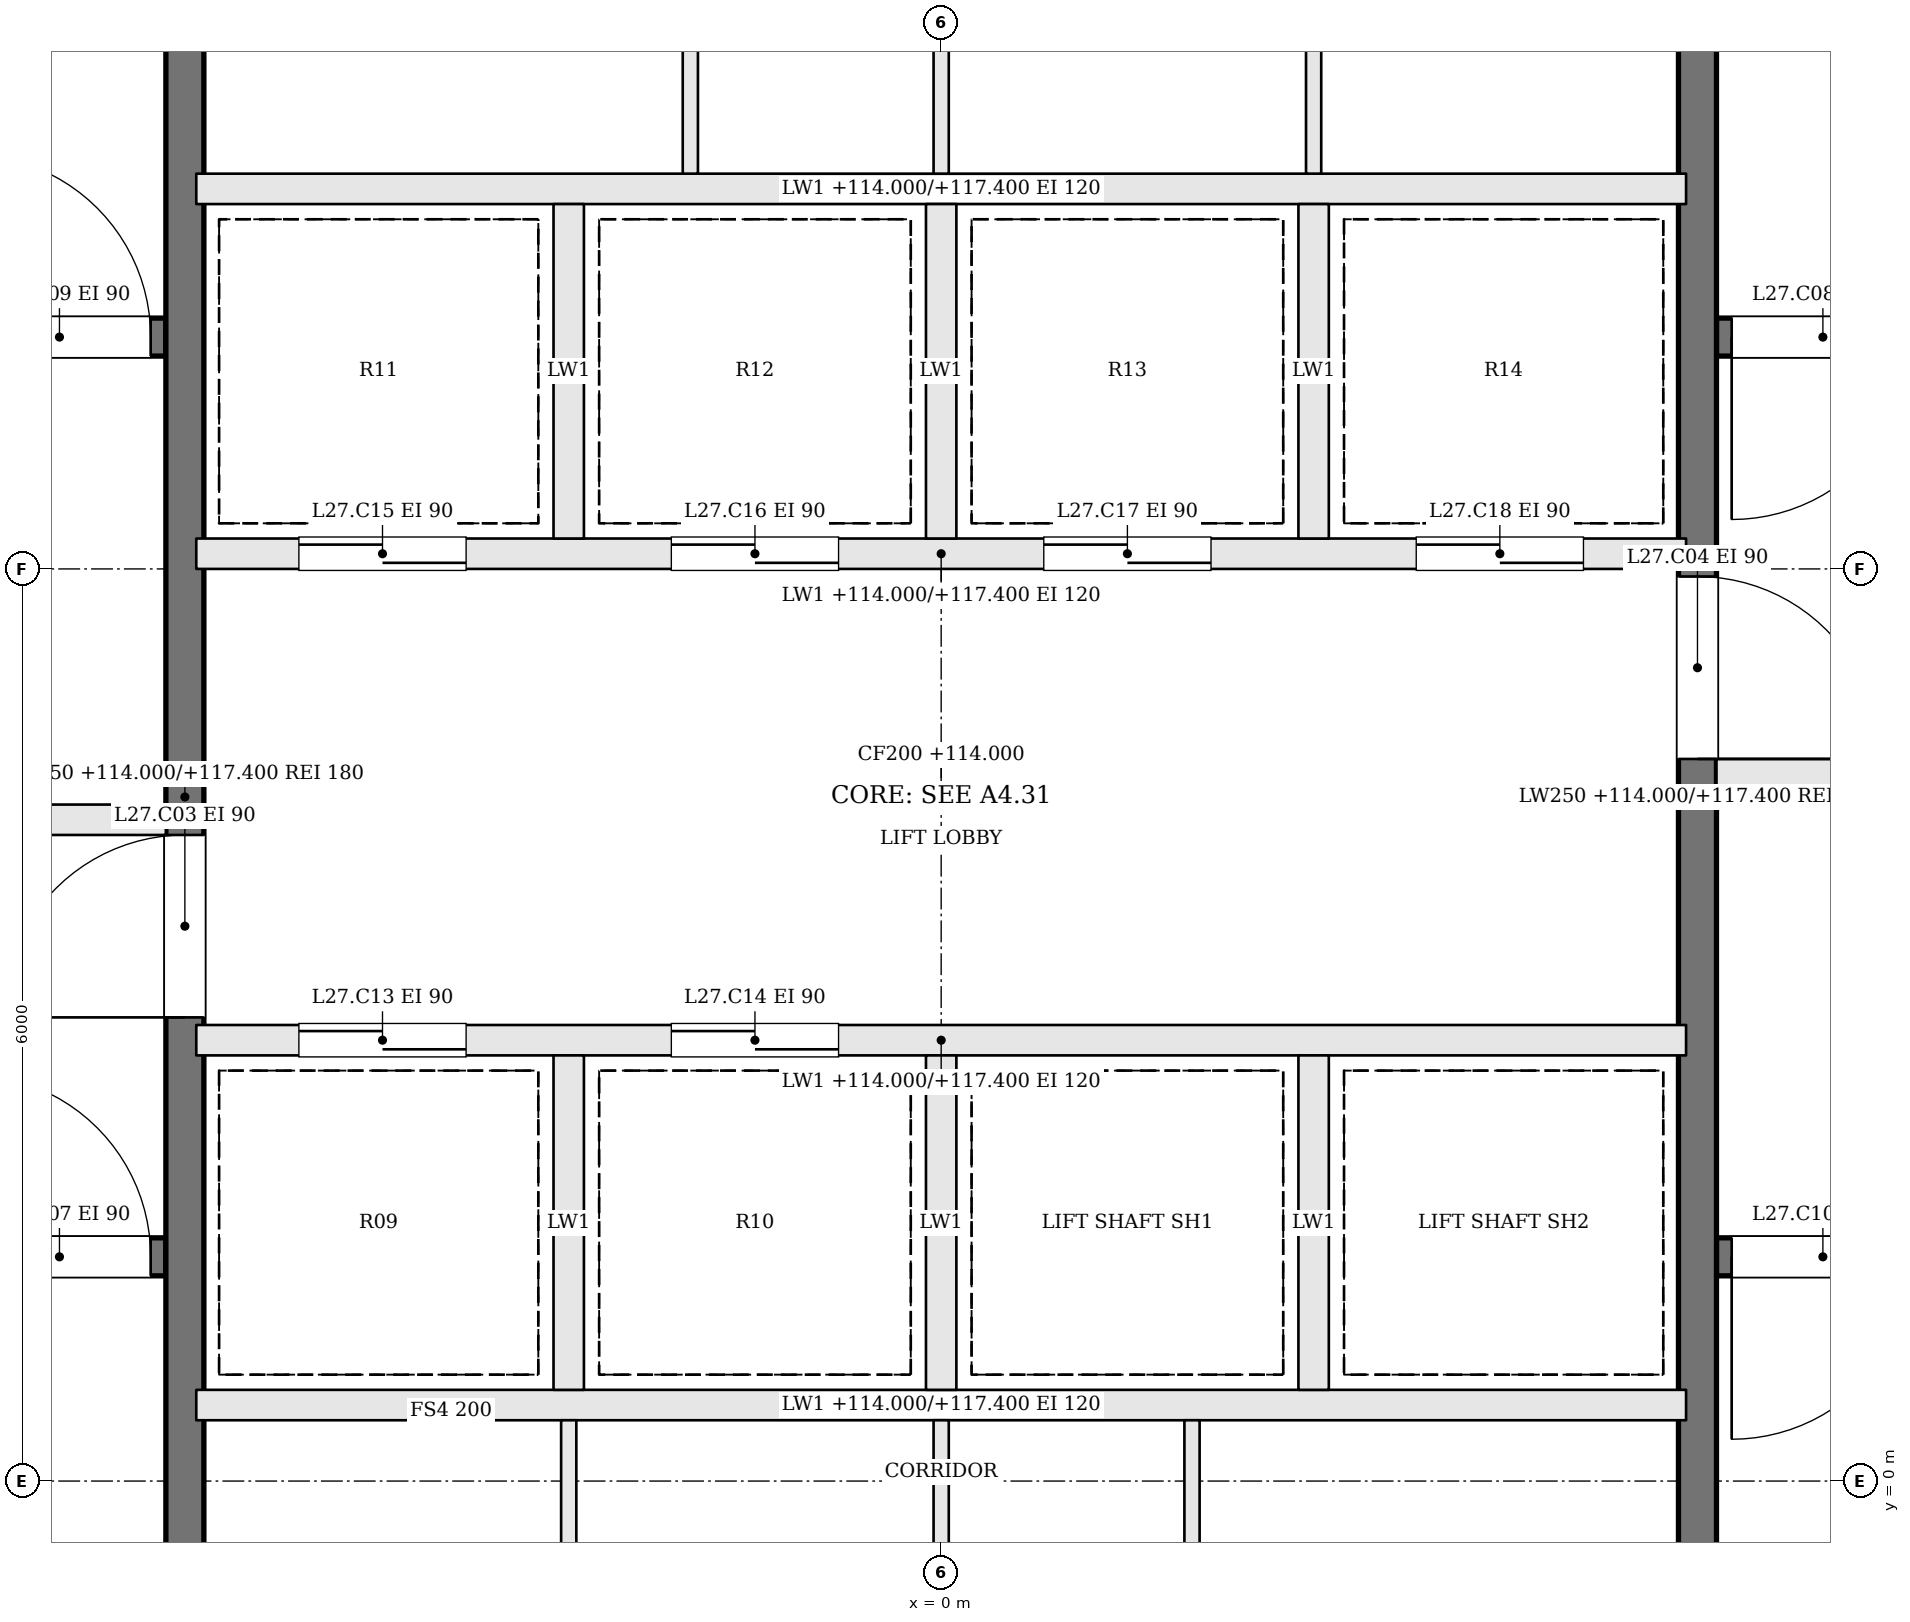
"""IFC4 building model, lengths in metres.
Left out: names, types, materials, properties, quantities, classifications, styles, units other than length and angle.
Written with IfcOpenShell. Run it as: python <this file> out.ifc"""

import sys

from ifc_helpers import new_model, si_unit, direction, frame, frame_2d, origin, place, context, subcontext, project, spatial, rectangle, extrude, element, fill, save


model = new_model("IFC4")
c1 = context("Model", 3, precision=1e-05, world=origin(), true_north=direction((0.0, 1.0)))
c2 = subcontext(c1, "Body", "Model", "MODEL_VIEW")
j1 = project(units=[si_unit("LENGTHUNIT", "METRE"), si_unit("PLANEANGLEUNIT", "RADIAN")], contexts=[c1])
p1 = place(None, origin())
s1 = spatial("IfcSite", under=j1, at=p1, CompositionType="ELEMENT")
p2 = place(p1, origin())
s2 = spatial("IfcBuilding", under=s1, at=p2, CompositionType="ELEMENT")
p3 = place(p2, frame((0.0, 0.0, 114.0)))
s3 = spatial("IfcBuildingStorey", under=s2, at=p3, CompositionType="ELEMENT", Elevation=114.0)
p4 = place(p3, frame((-11.9, 1.475, 0.0), z_axis=(0.0, 0.0, 1.0), x_axis=(1.0, 0.0, 0.0)))
e1 = element("IfcWall", 1, at=p4, inside=s3, PredefinedType="SOLIDWALL", context=c2, shape_type="SweptSolid", body=[
    extrude(rectangle(XDim=6.8, YDim=0.25, at=frame_2d((3.4, 0.0))), origin(), (0.0, 0.0, 1.0), 3.4),
])
p5 = place(p4, frame((5.5, 0.0, 0.0)))
e2 = element("IfcOpeningElement", 2, at=p5, cuts=e1, PredefinedType="OPENING", context=c2, shape_type="SweptSolid", body=[
    extrude(rectangle(XDim=1.2, YDim=2.1, at=frame_2d((0.6, 1.05))), frame((0.0, 0.135, 0.0), z_axis=(0.0, -1.0, 0.0), x_axis=(1.0, 0.0, 0.0)), (0.0, 0.0, 1.0), 0.27),
])
p6 = place(p3, frame((11.9, 7.525, 0.0), z_axis=(0.0, 0.0, 1.0), x_axis=(-1.0, 0.0, 0.0)))
e3 = element("IfcWall", 3, at=p6, inside=s3, PredefinedType="SOLIDWALL", context=c2, shape_type="SweptSolid", body=[
    extrude(rectangle(XDim=6.8, YDim=0.25, at=frame_2d((3.4, 0.0))), origin(), (0.0, 0.0, 1.0), 3.4),
])
p7 = place(p6, frame((5.5, 0.0, 0.0)))
e4 = element("IfcOpeningElement", 4, at=p7, cuts=e3, PredefinedType="OPENING", context=c2, shape_type="SweptSolid", body=[
    extrude(rectangle(XDim=1.2, YDim=2.1, at=frame_2d((0.6, 1.05))), frame((0.0, 0.135, 0.0), z_axis=(0.0, -1.0, 0.0), x_axis=(1.0, 0.0, 0.0)), (0.0, 0.0, 1.0), 0.27),
])
p8 = place(p3, frame((-11.9, 4.35, 0.0), z_axis=(0.0, 0.0, 1.0), x_axis=(1.0, 0.0, 0.0)))
e5 = element("IfcWall", 5, at=p8, inside=s3, PredefinedType="SOLIDWALL", context=c2, shape_type="SweptSolid", body=[
    extrude(rectangle(XDim=6.8, YDim=0.2, at=frame_2d((3.4, 0.0))), origin(), (0.0, 0.0, 1.0), 3.4),
])
p9 = place(p8, frame((4.1, 0.0, 0.0)))
e6 = element("IfcOpeningElement", 6, at=p9, cuts=e5, PredefinedType="OPENING", context=c2, shape_type="SweptSolid", body=[
    extrude(rectangle(XDim=1.2, YDim=2.1, at=frame_2d((0.6, 1.05))), frame((0.0, 0.11, 0.0), z_axis=(0.0, -1.0, 0.0), x_axis=(1.0, 0.0, 0.0)), (0.0, 0.0, 1.0), 0.22),
])
p10 = place(p8, frame((0.8, 0.0, 0.0)))
e7 = element("IfcOpeningElement", 7, at=p10, cuts=e5, PredefinedType="OPENING", context=c2, shape_type="SweptSolid", body=[
    extrude(rectangle(XDim=1.2, YDim=2.1, at=frame_2d((0.6, 1.05))), frame((0.0, 0.11, 0.0), z_axis=(0.0, -1.0, 0.0), x_axis=(1.0, 0.0, 0.0)), (0.0, 0.0, 1.0), 0.22),
])
p11 = place(p3, frame((11.9, 4.65, 0.0), z_axis=(0.0, 0.0, 1.0), x_axis=(-1.0, 0.0, 0.0)))
e8 = element("IfcWall", 8, at=p11, inside=s3, PredefinedType="SOLIDWALL", context=c2, shape_type="SweptSolid", body=[
    extrude(rectangle(XDim=6.8, YDim=0.2, at=frame_2d((3.4, 0.0))), origin(), (0.0, 0.0, 1.0), 3.4),
])
p12 = place(p11, frame((4.1, 0.0, 0.0)))
e9 = element("IfcOpeningElement", 9, at=p12, cuts=e8, PredefinedType="OPENING", context=c2, shape_type="SweptSolid", body=[
    extrude(rectangle(XDim=1.2, YDim=2.1, at=frame_2d((0.6, 1.05))), frame((0.0, 0.11, 0.0), z_axis=(0.0, -1.0, 0.0), x_axis=(1.0, 0.0, 0.0)), (0.0, 0.0, 1.0), 0.22),
])
p13 = place(p11, frame((0.8, 0.0, 0.0)))
e10 = element("IfcOpeningElement", 10, at=p13, cuts=e8, PredefinedType="OPENING", context=c2, shape_type="SweptSolid", body=[
    extrude(rectangle(XDim=1.2, YDim=2.1, at=frame_2d((0.6, 1.05))), frame((0.0, 0.11, 0.0), z_axis=(0.0, -1.0, 0.0), x_axis=(1.0, 0.0, 0.0)), (0.0, 0.0, 1.0), 0.22),
])
p14 = place(p3, frame((-11.9, 7.525, 0.0), z_axis=(0.0, 0.0, 1.0), x_axis=(1.0, 0.0, 0.0)))
e11 = element("IfcWall", 11, at=p14, inside=s3, PredefinedType="SOLIDWALL", context=c2, shape_type="SweptSolid", body=[
    extrude(rectangle(XDim=6.8, YDim=0.25, at=frame_2d((3.4, 0.0))), origin(), (0.0, 0.0, 1.0), 3.4),
])
p15 = place(p14, frame((5.5, 0.0, 0.0)))
e12 = element("IfcOpeningElement", 12, at=p15, cuts=e11, PredefinedType="OPENING", context=c2, shape_type="SweptSolid", body=[
    extrude(rectangle(XDim=1.2, YDim=2.1, at=frame_2d((0.6, 1.05))), frame((0.0, 0.135, 0.0), z_axis=(0.0, -1.0, 0.0), x_axis=(1.0, 0.0, 0.0)), (0.0, 0.0, 1.0), 0.27),
])
p16 = place(p3, frame((11.9, 1.475, 0.0), z_axis=(0.0, 0.0, 1.0), x_axis=(-1.0, 0.0, 0.0)))
e13 = element("IfcWall", 13, at=p16, inside=s3, PredefinedType="SOLIDWALL", context=c2, shape_type="SweptSolid", body=[
    extrude(rectangle(XDim=6.8, YDim=0.25, at=frame_2d((3.4, 0.0))), origin(), (0.0, 0.0, 1.0), 3.4),
])
p17 = place(p16, frame((5.5, 0.0, 0.0)))
e14 = element("IfcOpeningElement", 14, at=p17, cuts=e13, PredefinedType="OPENING", context=c2, shape_type="SweptSolid", body=[
    extrude(rectangle(XDim=1.2, YDim=2.1, at=frame_2d((0.6, 1.05))), frame((0.0, 0.135, 0.0), z_axis=(0.0, -1.0, 0.0), x_axis=(1.0, 0.0, 0.0)), (0.0, 0.0, 1.0), 0.27),
])
p18 = place(p3, frame((-4.975, -1.9, 0.0), z_axis=(0.0, 0.0, 1.0), x_axis=(0.0, 1.0, 0.0)))
e15 = element("IfcWall", 15, at=p18, inside=s3, PredefinedType="SOLIDWALL", context=c2, shape_type="SweptSolid", body=[
    extrude(rectangle(XDim=12.8, YDim=0.25, at=frame_2d((6.4, 0.0))), origin(), (0.0, 0.0, 1.0), 3.4),
])
p19 = place(p18, frame((4.95, 0.0, 0.0)))
e16 = element("IfcOpeningElement", 16, at=p19, cuts=e15, PredefinedType="OPENING", context=c2, shape_type="SweptSolid", body=[
    extrude(rectangle(XDim=1.2, YDim=2.1, at=frame_2d((0.6, 1.05))), frame((0.0, 0.135, 0.0), z_axis=(0.0, -1.0, 0.0), x_axis=(1.0, 0.0, 0.0)), (0.0, 0.0, 1.0), 0.27),
])
p20 = place(p3, frame((4.975, 10.9, 0.0), z_axis=(0.0, 0.0, 1.0), x_axis=(0.0, -1.0, 0.0)))
e17 = element("IfcWall", 17, at=p20, inside=s3, PredefinedType="SOLIDWALL", context=c2, shape_type="SweptSolid", body=[
    extrude(rectangle(XDim=12.8, YDim=0.25, at=frame_2d((6.4, 0.0))), origin(), (0.0, 0.0, 1.0), 3.4),
])
p21 = place(p20, frame((4.95, 0.0, 0.0)))
e18 = element("IfcOpeningElement", 18, at=p21, cuts=e17, PredefinedType="OPENING", context=c2, shape_type="SweptSolid", body=[
    extrude(rectangle(XDim=1.2, YDim=2.1, at=frame_2d((0.6, 1.05))), frame((0.0, 0.135, 0.0), z_axis=(0.0, -1.0, 0.0), x_axis=(1.0, 0.0, 0.0)), (0.0, 0.0, 1.0), 0.27),
])
p22 = place(p3, frame((-4.9, 0.5, 0.0), z_axis=(0.0, 0.0, 1.0), x_axis=(1.0, 0.0, 0.0)))
e19 = element("IfcWall", 19, at=p22, inside=s3, PredefinedType="SOLIDWALL", context=c2, shape_type="SweptSolid", body=[
    extrude(rectangle(XDim=9.8, YDim=0.2, at=frame_2d((4.9, 0.0))), origin(), (0.0, 0.0, 1.0), 3.4),
])
p23 = place(p3, frame((-4.9, 2.9, 0.0), z_axis=(0.0, 0.0, 1.0), x_axis=(1.0, 0.0, 0.0)))
e20 = element("IfcWall", 20, at=p23, inside=s3, PredefinedType="SOLIDWALL", context=c2, shape_type="SweptSolid", body=[
    extrude(rectangle(XDim=9.8, YDim=0.2, at=frame_2d((4.9, 0.0))), origin(), (0.0, 0.0, 1.0), 3.4),
])
p24 = place(p23, frame((0.675, 0.0, 0.0)))
e21 = element("IfcOpeningElement", 21, at=p24, cuts=e20, PredefinedType="OPENING", context=c2, shape_type="SweptSolid", body=[
    extrude(rectangle(XDim=1.1, YDim=2.1, at=frame_2d((0.55, 1.05))), frame((0.0, 0.11, 0.0), z_axis=(0.0, -1.0, 0.0), x_axis=(1.0, 0.0, 0.0)), (0.0, 0.0, 1.0), 0.22),
])
p25 = place(p23, frame((3.125, 0.0, 0.0)))
e22 = element("IfcOpeningElement", 22, at=p25, cuts=e20, PredefinedType="OPENING", context=c2, shape_type="SweptSolid", body=[
    extrude(rectangle(XDim=1.1, YDim=2.1, at=frame_2d((0.55, 1.05))), frame((0.0, 0.11, 0.0), z_axis=(0.0, -1.0, 0.0), x_axis=(1.0, 0.0, 0.0)), (0.0, 0.0, 1.0), 0.22),
])
p26 = place(p3, frame((-4.9, 6.1, 0.0), z_axis=(0.0, 0.0, 1.0), x_axis=(1.0, 0.0, 0.0)))
e23 = element("IfcWall", 23, at=p26, inside=s3, PredefinedType="SOLIDWALL", context=c2, shape_type="SweptSolid", body=[
    extrude(rectangle(XDim=9.8, YDim=0.2, at=frame_2d((4.9, 0.0))), origin(), (0.0, 0.0, 1.0), 3.4),
])
p27 = place(p26, frame((0.675, 0.0, 0.0)))
e24 = element("IfcOpeningElement", 24, at=p27, cuts=e23, PredefinedType="OPENING", context=c2, shape_type="SweptSolid", body=[
    extrude(rectangle(XDim=1.1, YDim=2.1, at=frame_2d((0.55, 1.05))), frame((0.0, 0.11, 0.0), z_axis=(0.0, -1.0, 0.0), x_axis=(1.0, 0.0, 0.0)), (0.0, 0.0, 1.0), 0.22),
])
p28 = place(p26, frame((3.125, 0.0, 0.0)))
e25 = element("IfcOpeningElement", 25, at=p28, cuts=e23, PredefinedType="OPENING", context=c2, shape_type="SweptSolid", body=[
    extrude(rectangle(XDim=1.1, YDim=2.1, at=frame_2d((0.55, 1.05))), frame((0.0, 0.11, 0.0), z_axis=(0.0, -1.0, 0.0), x_axis=(1.0, 0.0, 0.0)), (0.0, 0.0, 1.0), 0.22),
])
p29 = place(p26, frame((5.575, 0.0, 0.0)))
e26 = element("IfcOpeningElement", 26, at=p29, cuts=e23, PredefinedType="OPENING", context=c2, shape_type="SweptSolid", body=[
    extrude(rectangle(XDim=1.1, YDim=2.1, at=frame_2d((0.55, 1.05))), frame((0.0, 0.11, 0.0), z_axis=(0.0, -1.0, 0.0), x_axis=(1.0, 0.0, 0.0)), (0.0, 0.0, 1.0), 0.22),
])
p30 = place(p26, frame((8.025, 0.0, 0.0)))
e27 = element("IfcOpeningElement", 27, at=p30, cuts=e23, PredefinedType="OPENING", context=c2, shape_type="SweptSolid", body=[
    extrude(rectangle(XDim=1.1, YDim=2.1, at=frame_2d((0.55, 1.05))), frame((0.0, 0.11, 0.0), z_axis=(0.0, -1.0, 0.0), x_axis=(1.0, 0.0, 0.0)), (0.0, 0.0, 1.0), 0.22),
])
p31 = place(p3, frame((-4.9, 8.5, 0.0), z_axis=(0.0, 0.0, 1.0), x_axis=(1.0, 0.0, 0.0)))
e28 = element("IfcWall", 28, at=p31, inside=s3, PredefinedType="SOLIDWALL", context=c2, shape_type="SweptSolid", body=[
    extrude(rectangle(XDim=9.8, YDim=0.2, at=frame_2d((4.9, 0.0))), origin(), (0.0, 0.0, 1.0), 3.4),
])
for number, where, z_axis, x_axis in (
    (29, (-2.45, 0.6, 0.0), (0.0, 0.0, 1.0), (0.0, 1.0, 0.0)),
    (30, (0.0, 0.6, 0.0), (0.0, 0.0, 1.0), (0.0, 1.0, 0.0)),
    (31, (2.45, 0.6, 0.0), (0.0, 0.0, 1.0), (0.0, 1.0, 0.0)),
    (32, (-2.45, 6.2, 0.0), (0.0, 0.0, 1.0), (0.0, 1.0, 0.0)),
    (33, (0.0, 6.2, 0.0), (0.0, 0.0, 1.0), (0.0, 1.0, 0.0)),
    (34, (2.45, 6.2, 0.0), (0.0, 0.0, 1.0), (0.0, 1.0, 0.0)),
):
    element("IfcWall", number, at=place(p3, frame(where, z_axis=z_axis, x_axis=x_axis)), inside=s3, PredefinedType="SOLIDWALL", context=c2, shape_type="SweptSolid", body=[
        extrude(rectangle(XDim=2.2, YDim=0.2, at=frame_2d((1.1, 0.0))), origin(), (0.0, 0.0, 1.0), 3.4),
    ])
for number, where, z_axis, x_axis in (
    (35, (-2.45, -1.9, 0.0), (0.0, 0.0, 1.0), (0.0, 1.0, 0.0)),
    (36, (0.0, -1.9, 0.0), (0.0, 0.0, 1.0), (0.0, 1.0, 0.0)),
    (37, (1.65, -1.9, 0.0), (0.0, 0.0, 1.0), (0.0, 1.0, 0.0)),
    (38, (-1.65, 8.6, 0.0), (0.0, 0.0, 1.0), (0.0, 1.0, 0.0)),
    (39, (0.0, 8.6, 0.0), (0.0, 0.0, 1.0), (0.0, 1.0, 0.0)),
    (40, (2.45, 8.6, 0.0), (0.0, 0.0, 1.0), (0.0, 1.0, 0.0)),
):
    element("IfcWall", number, at=place(p3, frame(where, z_axis=z_axis, x_axis=x_axis)), inside=s3, PredefinedType="PARTITIONING", context=c2, shape_type="SweptSolid", body=[
        extrude(rectangle(XDim=2.3, YDim=0.1, at=frame_2d((1.15, 0.0))), origin(), (0.0, 0.0, 1.0), 3.4),
    ])
p32 = place(p19, origin())
e41 = element("IfcDoor", 41, at=p32, inside=s3, OperationType="SINGLE_SWING_LEFT", PredefinedType="DOOR", context=c2, shape_type="SweptSolid", body=[
    extrude(rectangle(XDim=1.2, YDim=2.1, at=frame_2d((0.6, 1.05))), frame((0.0, 0.025, 0.0), z_axis=(0.0, -1.0, 0.0), x_axis=(1.0, 0.0, 0.0)), (0.0, 0.0, 1.0), 0.05),
])
fill(e16, e41)
p33 = place(p21, origin())
e42 = element("IfcDoor", 42, at=p33, inside=s3, OperationType="SINGLE_SWING_RIGHT", PredefinedType="DOOR", context=c2, shape_type="SweptSolid", body=[
    extrude(rectangle(XDim=1.2, YDim=2.1, at=frame_2d((0.6, 1.05))), frame((0.0, 0.025, 0.0), z_axis=(0.0, -1.0, 0.0), x_axis=(1.0, 0.0, 0.0)), (0.0, 0.0, 1.0), 0.05),
])
fill(e18, e42)
p34 = place(p5, origin())
e43 = element("IfcDoor", 43, at=p34, inside=s3, OperationType="SINGLE_SWING_LEFT", PredefinedType="DOOR", context=c2, shape_type="SweptSolid", body=[
    extrude(rectangle(XDim=1.2, YDim=2.1, at=frame_2d((0.6, 1.05))), frame((0.0, 0.025, 0.0), z_axis=(0.0, -1.0, 0.0), x_axis=(1.0, 0.0, 0.0)), (0.0, 0.0, 1.0), 0.05),
])
fill(e2, e43)
p35 = place(p7, origin())
e44 = element("IfcDoor", 44, at=p35, inside=s3, OperationType="SINGLE_SWING_RIGHT", PredefinedType="DOOR", context=c2, shape_type="SweptSolid", body=[
    extrude(rectangle(XDim=1.2, YDim=2.1, at=frame_2d((0.6, 1.05))), frame((0.0, 0.025, 0.0), z_axis=(0.0, -1.0, 0.0), x_axis=(1.0, 0.0, 0.0)), (0.0, 0.0, 1.0), 0.05),
])
fill(e4, e44)
p36 = place(p15, origin())
e45 = element("IfcDoor", 45, at=p36, inside=s3, OperationType="SINGLE_SWING_LEFT", PredefinedType="DOOR", context=c2, shape_type="SweptSolid", body=[
    extrude(rectangle(XDim=1.2, YDim=2.1, at=frame_2d((0.6, 1.05))), frame((0.0, 0.025, 0.0), z_axis=(0.0, -1.0, 0.0), x_axis=(1.0, 0.0, 0.0)), (0.0, 0.0, 1.0), 0.05),
])
fill(e12, e45)
p37 = place(p17, origin())
e46 = element("IfcDoor", 46, at=p37, inside=s3, OperationType="SINGLE_SWING_RIGHT", PredefinedType="DOOR", context=c2, shape_type="SweptSolid", body=[
    extrude(rectangle(XDim=1.2, YDim=2.1, at=frame_2d((0.6, 1.05))), frame((0.0, 0.025, 0.0), z_axis=(0.0, -1.0, 0.0), x_axis=(1.0, 0.0, 0.0)), (0.0, 0.0, 1.0), 0.05),
])
fill(e14, e46)
p38 = place(p24, origin())
e47 = element("IfcDoor", 47, at=p38, inside=s3, OperationType="SLIDING_TO_RIGHT", PredefinedType="DOOR", context=c2, shape_type="SweptSolid", body=[
    extrude(rectangle(XDim=1.1, YDim=2.1, at=frame_2d((0.55, 1.05))), frame((0.0, 0.025, 0.0), z_axis=(0.0, -1.0, 0.0), x_axis=(1.0, 0.0, 0.0)), (0.0, 0.0, 1.0), 0.05),
])
fill(e21, e47)
p39 = place(p25, origin())
e48 = element("IfcDoor", 48, at=p39, inside=s3, OperationType="SLIDING_TO_LEFT", PredefinedType="DOOR", context=c2, shape_type="SweptSolid", body=[
    extrude(rectangle(XDim=1.1, YDim=2.1, at=frame_2d((0.55, 1.05))), frame((0.0, 0.025, 0.0), z_axis=(0.0, -1.0, 0.0), x_axis=(1.0, 0.0, 0.0)), (0.0, 0.0, 1.0), 0.05),
])
fill(e22, e48)
p40 = place(p27, origin())
e49 = element("IfcDoor", 49, at=p40, inside=s3, OperationType="SLIDING_TO_RIGHT", PredefinedType="DOOR", context=c2, shape_type="SweptSolid", body=[
    extrude(rectangle(XDim=1.1, YDim=2.1, at=frame_2d((0.55, 1.05))), frame((0.0, 0.025, 0.0), z_axis=(0.0, -1.0, 0.0), x_axis=(1.0, 0.0, 0.0)), (0.0, 0.0, 1.0), 0.05),
])
fill(e24, e49)
p41 = place(p28, origin())
e50 = element("IfcDoor", 50, at=p41, inside=s3, OperationType="SLIDING_TO_LEFT", PredefinedType="DOOR", context=c2, shape_type="SweptSolid", body=[
    extrude(rectangle(XDim=1.1, YDim=2.1, at=frame_2d((0.55, 1.05))), frame((0.0, 0.025, 0.0), z_axis=(0.0, -1.0, 0.0), x_axis=(1.0, 0.0, 0.0)), (0.0, 0.0, 1.0), 0.05),
])
fill(e25, e50)
p42 = place(p29, origin())
e51 = element("IfcDoor", 51, at=p42, inside=s3, OperationType="SLIDING_TO_RIGHT", PredefinedType="DOOR", context=c2, shape_type="SweptSolid", body=[
    extrude(rectangle(XDim=1.1, YDim=2.1, at=frame_2d((0.55, 1.05))), frame((0.0, 0.025, 0.0), z_axis=(0.0, -1.0, 0.0), x_axis=(1.0, 0.0, 0.0)), (0.0, 0.0, 1.0), 0.05),
])
fill(e26, e51)
p43 = place(p30, origin())
e52 = element("IfcDoor", 52, at=p43, inside=s3, OperationType="SLIDING_TO_LEFT", PredefinedType="DOOR", context=c2, shape_type="SweptSolid", body=[
    extrude(rectangle(XDim=1.1, YDim=2.1, at=frame_2d((0.55, 1.05))), frame((0.0, 0.025, 0.0), z_axis=(0.0, -1.0, 0.0), x_axis=(1.0, 0.0, 0.0)), (0.0, 0.0, 1.0), 0.05),
])
fill(e27, e52)
save(model, sys.argv[1])
